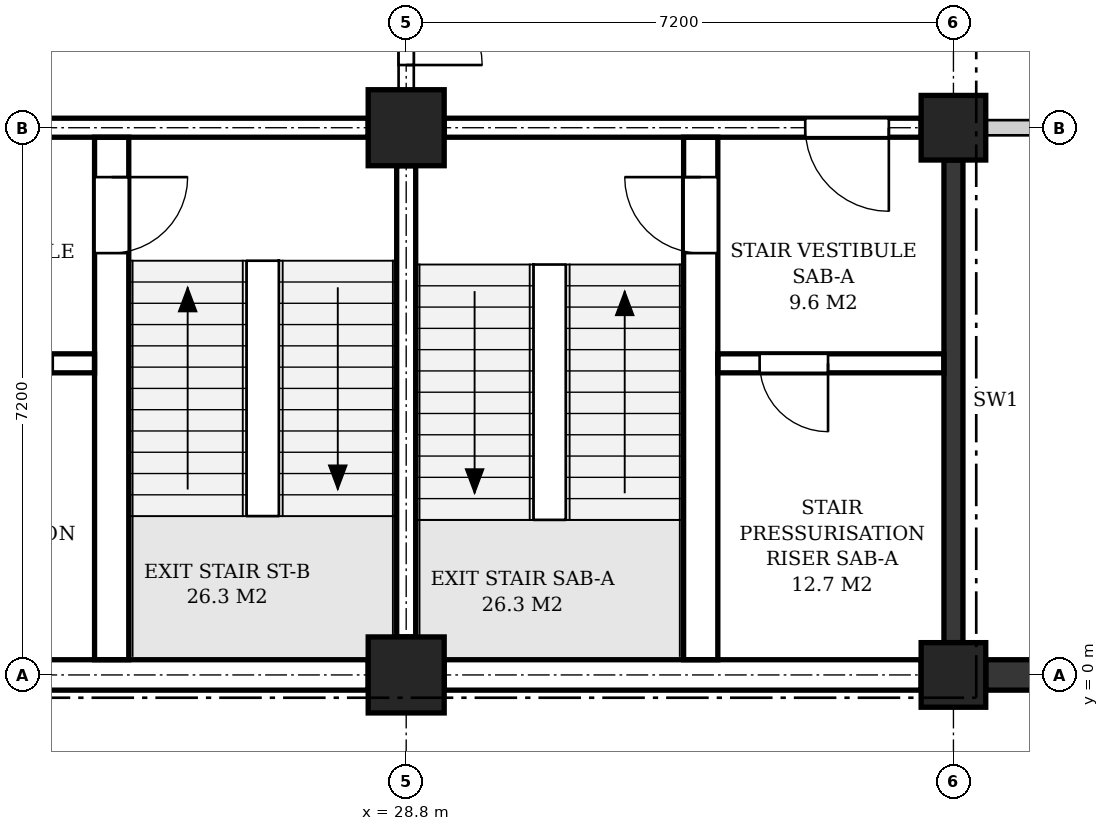
"""IFC4 building model, lengths in metres.
Left out: names, types, materials, properties, quantities, classifications, styles, units other than length and angle.
Written with IfcOpenShell. Run it as: python <this file> out.ifc"""

import sys

from ifc_helpers import new_model, si_unit, direction, frame, frame_2d, origin, origin_2d, place, context, subcontext, project, spatial, rectangle, extrude, element, fill, save


model = new_model("IFC4")
c1 = context("Model", 3, precision=1e-05, world=origin(), true_north=direction((0.0, 1.0)))
c2 = subcontext(c1, "Body", "Model", "MODEL_VIEW")
j1 = project(units=[si_unit("LENGTHUNIT", "METRE"), si_unit("PLANEANGLEUNIT", "RADIAN")], contexts=[c1])
p1 = place(None, origin())
s1 = spatial("IfcSite", under=j1, at=p1, CompositionType="ELEMENT")
p2 = place(p1, origin())
s2 = spatial("IfcBuilding", under=s1, at=p2, CompositionType="ELEMENT")
p3 = place(p2, frame((0.0, 0.0, -4.5)))
s3 = spatial("IfcBuildingStorey", under=s2, at=p3, CompositionType="ELEMENT", Elevation=-4.5)
for number, where, z_axis, x_axis in (
    (1, (28.8, 0.0, 0.0), (0.0, 0.0, 1.0), (1.0, 0.0, 0.0)),
    (2, (28.8, 7.2, 0.0), (0.0, 0.0, 1.0), (1.0, 0.0, 0.0)),
):
    element("IfcColumn", number, at=place(p3, frame(where, z_axis=z_axis, x_axis=x_axis)), inside=s3, PredefinedType="COLUMN", context=c2, shape_type="SweptSolid", body=[
        extrude(rectangle(XDim=1.0, YDim=1.0, at=origin_2d()), origin(), (0.0, 0.0, 1.0), 4.5),
    ])
for number, where, z_axis, x_axis in (
    (3, (36.0, 0.0, 0.0), (0.0, 0.0, 1.0), (1.0, 0.0, 0.0)),
    (4, (36.0, 7.2, 0.0), (0.0, 0.0, 1.0), (1.0, 0.0, 0.0)),
):
    element("IfcColumn", number, at=place(p3, frame(where, z_axis=z_axis, x_axis=x_axis)), inside=s3, PredefinedType="COLUMN", context=c2, shape_type="SweptSolid", body=[
        extrude(rectangle(XDim=0.85, YDim=0.85, at=origin_2d()), origin(), (0.0, 0.0, 1.0), 4.5),
    ])
p4 = place(p3, frame((22.1, 0.0, 0.0), z_axis=(0.0, 0.0, 1.0), x_axis=(1.0, 0.0, 0.0)))
e5 = element("IfcWall", 5, at=p4, inside=s3, PredefinedType="SOLIDWALL", context=c2, shape_type="SweptSolid", body=[
    extrude(rectangle(XDim=6.2, YDim=0.4, at=frame_2d((3.1, 0.0))), origin(), (0.0, 0.0, 1.0), 3.6),
])
p5 = place(p3, frame((29.3, 0.0, 0.0), z_axis=(0.0, 0.0, 1.0), x_axis=(1.0, 0.0, 0.0)))
e6 = element("IfcWall", 6, at=p5, inside=s3, PredefinedType="SOLIDWALL", context=c2, shape_type="SweptSolid", body=[
    extrude(rectangle(XDim=6.275, YDim=0.4, at=frame_2d((3.137, 0.0))), origin(), (0.0, 0.0, 1.0), 3.6),
])
p6 = place(p3, frame((36.425, 0.0, 0.0), z_axis=(0.0, 0.0, 1.0), x_axis=(1.0, 0.0, 0.0)))
e7 = element("IfcWall", 7, at=p6, inside=s3, PredefinedType="SOLIDWALL", context=c2, shape_type="SweptSolid", body=[
    extrude(rectangle(XDim=6.35, YDim=0.4, at=frame_2d((3.175, 0.0))), origin(), (0.0, 0.0, 1.0), 3.6),
])
p7 = place(p3, frame((29.3, 7.2, 0.0), z_axis=(0.0, 0.0, 1.0), x_axis=(1.0, 0.0, 0.0)))
e8 = element("IfcWall", 8, at=p7, inside=s3, PredefinedType="SHEAR", context=c2, shape_type="SweptSolid", body=[
    extrude(rectangle(XDim=6.275, YDim=0.25, at=frame_2d((3.137, 0.0))), origin(), (0.0, 0.0, 1.0), 3.4),
])
p8 = place(p7, frame((4.75, 0.0, 0.0)))
e9 = element("IfcOpeningElement", 9, at=p8, cuts=e8, PredefinedType="OPENING", context=c2, shape_type="SweptSolid", body=[
    extrude(rectangle(XDim=1.1, YDim=2.1, at=frame_2d((0.55, 1.05))), frame((0.0, 0.135, 0.0), z_axis=(0.0, -1.0, 0.0), x_axis=(1.0, 0.0, 0.0)), (0.0, 0.0, 1.0), 0.27),
])
p9 = place(p3, frame((28.8, 0.5, 0.0), z_axis=(0.0, 0.0, 1.0), x_axis=(0.0, 1.0, 0.0)))
e10 = element("IfcWall", 10, at=p9, inside=s3, PredefinedType="SHEAR", context=c2, shape_type="SweptSolid", body=[
    extrude(rectangle(XDim=6.2, YDim=0.25, at=frame_2d((3.1, 0.0))), origin(), (0.0, 0.0, 1.0), 3.4),
])
p10 = place(p3, frame((36.0, 0.425, 0.0), z_axis=(0.0, 0.0, 1.0), x_axis=(0.0, 1.0, 0.0)))
e11 = element("IfcWall", 11, at=p10, inside=s3, PredefinedType="SHEAR", context=c2, shape_type="SweptSolid", body=[
    extrude(rectangle(XDim=6.35, YDim=0.25, at=frame_2d((3.175, 0.0))), origin(), (0.0, 0.0, 1.0), 3.4),
])
p11 = place(p3, frame((32.675, 0.2, 0.0), z_axis=(0.0, 0.0, 1.0), x_axis=(0.0, 1.0, 0.0)))
e12 = element("IfcWall", 12, at=p11, inside=s3, PredefinedType="SHEAR", context=c2, shape_type="SweptSolid", body=[
    extrude(rectangle(XDim=6.875, YDim=0.45, at=frame_2d((3.438, 0.0))), origin(), (0.0, 0.0, 1.0), 4.2),
])
p12 = place(p11, frame((5.35, 0.0, 0.0)))
e13 = element("IfcOpeningElement", 13, at=p12, cuts=e12, PredefinedType="OPENING", context=c2, shape_type="SweptSolid", body=[
    extrude(rectangle(XDim=1.0, YDim=2.1, at=frame_2d((0.5, 1.05))), frame((0.0, 0.235, 0.0), z_axis=(0.0, -1.0, 0.0), x_axis=(1.0, 0.0, 0.0)), (0.0, 0.0, 1.0), 0.47),
])
p13 = place(p3, frame((32.9, 4.1, 0.0), z_axis=(0.0, 0.0, 1.0), x_axis=(1.0, 0.0, 0.0)))
e14 = element("IfcWall", 14, at=p13, inside=s3, PredefinedType="SHEAR", context=c2, shape_type="SweptSolid", body=[
    extrude(rectangle(XDim=2.975, YDim=0.25, at=frame_2d((1.488, 0.0))), origin(), (0.0, 0.0, 1.0), 4.2),
])
p14 = place(p13, frame((0.55, 0.0, 0.0)))
e15 = element("IfcOpeningElement", 15, at=p14, cuts=e14, PredefinedType="OPENING", context=c2, shape_type="SweptSolid", body=[
    extrude(rectangle(XDim=0.9, YDim=2.1, at=frame_2d((0.45, 1.05))), frame((0.0, 0.135, 0.0), z_axis=(0.0, -1.0, 0.0), x_axis=(1.0, 0.0, 0.0)), (0.0, 0.0, 1.0), 0.27),
])
p15 = place(p3, frame((22.1, 7.2, 0.0), z_axis=(0.0, 0.0, 1.0), x_axis=(1.0, 0.0, 0.0)))
e16 = element("IfcWall", 16, at=p15, inside=s3, PredefinedType="SHEAR", context=c2, shape_type="SweptSolid", body=[
    extrude(rectangle(XDim=6.2, YDim=0.25, at=frame_2d((3.1, 0.0))), origin(), (0.0, 0.0, 1.0), 3.4),
])
p16 = place(p15, frame((0.35, 0.0, 0.0)))
e17 = element("IfcOpeningElement", 17, at=p16, cuts=e16, PredefinedType="OPENING", context=c2, shape_type="SweptSolid", body=[
    extrude(rectangle(XDim=1.1, YDim=2.1, at=frame_2d((0.55, 1.05))), frame((0.0, 0.135, 0.0), z_axis=(0.0, -1.0, 0.0), x_axis=(1.0, 0.0, 0.0)), (0.0, 0.0, 1.0), 0.27),
])
p17 = place(p3, frame((24.925, 0.2, 0.0), z_axis=(0.0, 0.0, 1.0), x_axis=(0.0, 1.0, 0.0)))
e18 = element("IfcWall", 18, at=p17, inside=s3, PredefinedType="SHEAR", context=c2, shape_type="SweptSolid", body=[
    extrude(rectangle(XDim=6.875, YDim=0.45, at=frame_2d((3.438, 0.0))), origin(), (0.0, 0.0, 1.0), 4.2),
])
p18 = place(p17, frame((5.35, 0.0, 0.0)))
e19 = element("IfcOpeningElement", 19, at=p18, cuts=e18, PredefinedType="OPENING", context=c2, shape_type="SweptSolid", body=[
    extrude(rectangle(XDim=1.0, YDim=2.1, at=frame_2d((0.5, 1.05))), frame((0.0, 0.235, 0.0), z_axis=(0.0, -1.0, 0.0), x_axis=(1.0, 0.0, 0.0)), (0.0, 0.0, 1.0), 0.47),
])
p19 = place(p3, frame((21.725, 4.1, 0.0), z_axis=(0.0, 0.0, 1.0), x_axis=(1.0, 0.0, 0.0)))
e20 = element("IfcWall", 20, at=p19, inside=s3, PredefinedType="SHEAR", context=c2, shape_type="SweptSolid", body=[
    extrude(rectangle(XDim=2.975, YDim=0.25, at=frame_2d((1.487, 0.0))), origin(), (0.0, 0.0, 1.0), 4.2),
])
p20 = place(p19, frame((1.525, 0.0, 0.0)))
e21 = element("IfcOpeningElement", 21, at=p20, cuts=e20, PredefinedType="OPENING", context=c2, shape_type="SweptSolid", body=[
    extrude(rectangle(XDim=0.9, YDim=2.1, at=frame_2d((0.45, 1.05))), frame((0.0, 0.135, 0.0), z_axis=(0.0, -1.0, 0.0), x_axis=(1.0, 0.0, 0.0)), (0.0, 0.0, 1.0), 0.27),
])
p21 = place(p3, frame((36.425, 7.2, 0.0), z_axis=(0.0, 0.0, 1.0), x_axis=(1.0, 0.0, 0.0)))
e22 = element("IfcWall", 22, at=p21, inside=s3, PredefinedType="PARTITIONING", context=c2, shape_type="SweptSolid", body=[
    extrude(rectangle(XDim=6.35, YDim=0.2, at=frame_2d((3.175, 0.0))), origin(), (0.0, 0.0, 1.0), 3.4),
])
p22 = place(p3, frame((28.8, 7.7, 0.0), z_axis=(0.0, 0.0, 1.0), x_axis=(0.0, 1.0, 0.0)))
e23 = element("IfcWall", 23, at=p22, inside=s3, PredefinedType="PARTITIONING", context=c2, shape_type="SweptSolid", body=[
    extrude(rectangle(XDim=2.65, YDim=0.2, at=frame_2d((1.325, 0.0))), origin(), (0.0, 0.0, 1.0), 3.4),
])
p23 = place(p22, frame((0.325, 0.0, 0.0)))
e24 = element("IfcOpeningElement", 24, at=p23, cuts=e23, PredefinedType="OPENING", context=c2, shape_type="SweptSolid", body=[
    extrude(rectangle(XDim=2.0, YDim=2.4, at=frame_2d((1.0, 1.2))), frame((0.0, 0.11, 0.0), z_axis=(0.0, -1.0, 0.0), x_axis=(1.0, 0.0, 0.0)), (0.0, 0.0, 1.0), 0.22),
])
p24 = place(p12, origin())
e25 = element("IfcDoor", 25, at=p24, inside=s3, OperationType="SINGLE_SWING_RIGHT", PredefinedType="DOOR", context=c2, shape_type="SweptSolid", body=[
    extrude(rectangle(XDim=1.0, YDim=2.1, at=frame_2d((0.5, 1.05))), frame((0.0, 0.025, 0.0), z_axis=(0.0, -1.0, 0.0), x_axis=(1.0, 0.0, 0.0)), (0.0, 0.0, 1.0), 0.05),
])
fill(e13, e25)
p25 = place(p8, frame((1.1, 0.0, 0.0), z_axis=(0.0, 0.0, 1.0), x_axis=(-1.0, 0.0, 0.0)))
e26 = element("IfcDoor", 26, at=p25, inside=s3, OperationType="SINGLE_SWING_LEFT", PredefinedType="DOOR", context=c2, shape_type="SweptSolid", body=[
    extrude(rectangle(XDim=1.1, YDim=2.1, at=frame_2d((0.55, 1.05))), frame((0.0, 0.025, 0.0), z_axis=(0.0, -1.0, 0.0), x_axis=(1.0, 0.0, 0.0)), (0.0, 0.0, 1.0), 0.05),
])
fill(e9, e26)
p26 = place(p14, frame((0.9, 0.0, 0.0), z_axis=(0.0, 0.0, 1.0), x_axis=(-1.0, 0.0, 0.0)))
e27 = element("IfcDoor", 27, at=p26, inside=s3, OperationType="SINGLE_SWING_LEFT", PredefinedType="DOOR", context=c2, shape_type="SweptSolid", body=[
    extrude(rectangle(XDim=0.9, YDim=2.1, at=frame_2d((0.45, 1.05))), frame((0.0, 0.025, 0.0), z_axis=(0.0, -1.0, 0.0), x_axis=(1.0, 0.0, 0.0)), (0.0, 0.0, 1.0), 0.05),
])
fill(e15, e27)
p27 = place(p18, frame((1.0, 0.0, 0.0), z_axis=(0.0, 0.0, 1.0), x_axis=(-1.0, 0.0, 0.0)))
e28 = element("IfcDoor", 28, at=p27, inside=s3, OperationType="SINGLE_SWING_LEFT", PredefinedType="DOOR", context=c2, shape_type="SweptSolid", body=[
    extrude(rectangle(XDim=1.0, YDim=2.1, at=frame_2d((0.5, 1.05))), frame((0.0, 0.025, 0.0), z_axis=(0.0, -1.0, 0.0), x_axis=(1.0, 0.0, 0.0)), (0.0, 0.0, 1.0), 0.05),
])
fill(e19, e28)
p28 = place(p23, origin())
e29 = element("IfcDoor", 29, at=p28, inside=s3, OperationType="DOUBLE_DOOR_SINGLE_SWING", PredefinedType="DOOR", context=c2, shape_type="SweptSolid", body=[
    extrude(rectangle(XDim=2.0, YDim=2.4, at=frame_2d((1.0, 1.2))), frame((0.0, 0.025, 0.0), z_axis=(0.0, -1.0, 0.0), x_axis=(1.0, 0.0, 0.0)), (0.0, 0.0, 1.0), 0.05),
])
fill(e24, e29)
save(model, sys.argv[1])
